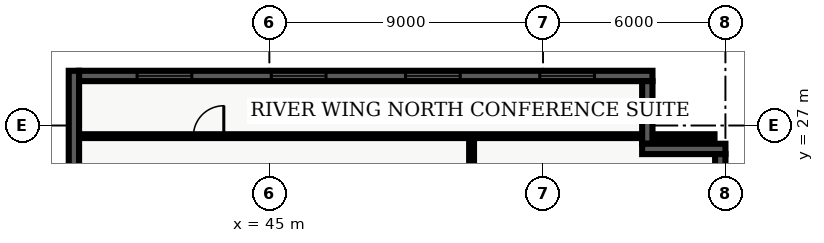
"""IFC4 building model, lengths in metres.
Left out: names, types, materials, properties, quantities, classifications, styles, units other than length and angle.
Written with IfcOpenShell. Run it as: python <this file> out.ifc"""

import sys

from ifc_helpers import new_model, entity, si_unit, converted_unit, direction, frame, origin_with_axes, origin_2d_with_axis, place, context, subcontext, project, spatial, polyline, rectangle, outline, extrude, element, fill, save


model = new_model("IFC4")
c1 = context("Model", 3, precision=1e-05, world=origin_with_axes(), true_north=direction((0.0, 1.0)))
c2 = subcontext(c1, "Body", "Model", "MODEL_VIEW")
j1 = project(units=[si_unit("LENGTHUNIT", "METRE"), converted_unit("PLANEANGLEUNIT", "DEGREE", entity("IfcPlaneAngleMeasure", 0.017), si_unit("PLANEANGLEUNIT", "RADIAN"), dimensions=[0, 0, 0, 0, 0, 0, 0])], contexts=[c1])
p1 = place(None, origin_with_axes())
s1 = spatial("IfcSite", under=j1, at=p1, CompositionType="ELEMENT")
p2 = place(p1, origin_with_axes())
s2 = spatial("IfcBuilding", under=s1, at=p2, CompositionType="ELEMENT")
p3 = place(p2, frame((0.0, 0.0, 212.1), z_axis=(0.0, 0.0, 1.0), x_axis=(1.0, 0.0, 0.0)))
s3 = spatial("IfcBuildingStorey", under=s2, at=p3, CompositionType="ELEMENT", Elevation=212.1)
p4 = place(p3, frame((51.65, 7.85, 0.0), z_axis=(0.0, 0.0, 1.0), x_axis=(0.0, 1.0, 0.0)))
e1 = element("IfcWall", 1, at=p4, inside=s3, PredefinedType="PARTITIONING", context=c2, shape_type="SweptSolid", body=[
    extrude(outline(polyline([(0.0, -0.08), (18.8, -0.08), (18.8, 0.08), (0.0, 0.08), (0.0, -0.08)])), origin_with_axes(), (0.0, 0.0, 1.0), 2.7),
])
p5 = place(p4, frame((4.298, 0.0, 0.0), z_axis=(0.0, 0.0, 1.0), x_axis=(1.0, 0.0, 0.0)))
e2 = element("IfcOpeningElement", 2, at=p5, cuts=e1, PredefinedType="OPENING", context=c2, shape_type="SweptSolid", body=[
    extrude(rectangle(XDim=1.0, YDim=0.18, at=origin_2d_with_axis()), origin_with_axes(), (0.0, 0.0, 1.0), 2.15),
])
p6 = place(p4, frame((13.639, 0.0, 0.0), z_axis=(0.0, 0.0, 1.0), x_axis=(1.0, 0.0, 0.0)))
e3 = element("IfcOpeningElement", 3, at=p6, cuts=e1, PredefinedType="OPENING", context=c2, shape_type="SweptSolid", body=[
    extrude(rectangle(XDim=1.0, YDim=0.18, at=origin_2d_with_axis()), origin_with_axes(), (0.0, 0.0, 1.0), 2.15),
])
p7 = place(p3, frame((38.735, 26.65, 0.0), z_axis=(0.0, 0.0, 1.0), x_axis=(1.0, 0.0, 0.0)))
e4 = element("IfcWall", 4, at=p7, inside=s3, PredefinedType="PARTITIONING", context=c2, shape_type="SweptSolid", body=[
    extrude(outline(polyline([(0.0, -0.062), (20.905, -0.062), (20.905, 0.062), (0.0, 0.062), (0.0, -0.062)])), origin_with_axes(), (0.0, 0.0, 1.0), 2.7),
])
p8 = place(p7, frame((4.265, 0.0, 0.0), z_axis=(0.0, 0.0, 1.0), x_axis=(1.0, 0.0, 0.0)))
e5 = element("IfcOpeningElement", 5, at=p8, cuts=e4, PredefinedType="OPENING", context=c2, shape_type="SweptSolid", body=[
    extrude(rectangle(XDim=1.0, YDim=0.145, at=origin_2d_with_axis()), origin_with_axes(), (0.0, 0.0, 1.0), 2.15),
])
p9 = place(p3, frame((38.57, 21.26, 0.0), z_axis=(0.0, 0.0, 1.0), x_axis=(0.0, 1.0, 0.0)))
e6 = element("IfcWall", 6, at=p9, inside=s3, PredefinedType="SOLIDWALL", context=c2, shape_type="SweptSolid", body=[
    extrude(outline(polyline([(0.0, -0.17), (7.54, -0.17), (7.54, 0.17), (0.0, 0.17), (0.0, -0.17)])), origin_with_axes(), (0.0, 0.0, 1.0), 3.66),
])
p10 = place(p3, frame((38.74, 28.63, 0.0), z_axis=(0.0, 0.0, 1.0), x_axis=(1.0, 0.0, 0.0)))
e7 = element("IfcWall", 7, at=p10, inside=s3, PredefinedType="SOLIDWALL", context=c2, shape_type="SweptSolid", body=[
    extrude(outline(polyline([(0.0, -0.17), (18.86, -0.17), (18.86, 0.17), (0.0, 0.17), (0.0, -0.17)])), origin_with_axes(), (0.0, 0.0, 1.0), 3.66),
])
p11 = place(p10, frame((2.808, 0.0, 0.45), z_axis=(0.0, 0.0, 1.0), x_axis=(1.0, 0.0, 0.0)))
e8 = element("IfcOpeningElement", 8, at=p11, cuts=e7, PredefinedType="OPENING", context=c2, shape_type="SweptSolid", body=[
    extrude(rectangle(XDim=1.8, YDim=0.36, at=origin_2d_with_axis()), origin_with_axes(), (0.0, 0.0, 1.0), 2.1),
])
p12 = place(p10, frame((7.222, 0.0, 0.45), z_axis=(0.0, 0.0, 1.0), x_axis=(1.0, 0.0, 0.0)))
e9 = element("IfcOpeningElement", 9, at=p12, cuts=e7, PredefinedType="OPENING", context=c2, shape_type="SweptSolid", body=[
    extrude(rectangle(XDim=1.8, YDim=0.36, at=origin_2d_with_axis()), origin_with_axes(), (0.0, 0.0, 1.0), 2.1),
])
p13 = place(p10, frame((11.637, 0.0, 0.45), z_axis=(0.0, 0.0, 1.0), x_axis=(1.0, 0.0, 0.0)))
e10 = element("IfcOpeningElement", 10, at=p13, cuts=e7, PredefinedType="OPENING", context=c2, shape_type="SweptSolid", body=[
    extrude(rectangle(XDim=1.8, YDim=0.36, at=origin_2d_with_axis()), origin_with_axes(), (0.0, 0.0, 1.0), 2.1),
])
p14 = place(p10, frame((16.053, 0.0, 0.45), z_axis=(0.0, 0.0, 1.0), x_axis=(1.0, 0.0, 0.0)))
e11 = element("IfcOpeningElement", 11, at=p14, cuts=e7, PredefinedType="OPENING", context=c2, shape_type="SweptSolid", body=[
    extrude(rectangle(XDim=1.8, YDim=0.36, at=origin_2d_with_axis()), origin_with_axes(), (0.0, 0.0, 1.0), 2.1),
])
p15 = place(p3, frame((57.43, 28.46, 0.0), z_axis=(0.0, 0.0, 1.0), x_axis=(0.0, -1.0, 0.0)))
e12 = element("IfcWall", 12, at=p15, inside=s3, PredefinedType="SOLIDWALL", context=c2, shape_type="SweptSolid", body=[
    extrude(outline(polyline([(0.0, -0.17), (2.06, -0.17), (2.06, 0.17), (0.0, 0.17), (0.0, -0.17)])), origin_with_axes(), (0.0, 0.0, 1.0), 3.66),
])
p16 = place(p3, frame((57.26, 26.23, 0.0), z_axis=(0.0, 0.0, 1.0), x_axis=(1.0, 0.0, 0.0)))
e13 = element("IfcWall", 13, at=p16, inside=s3, PredefinedType="SOLIDWALL", context=c2, shape_type="SweptSolid", body=[
    extrude(outline(polyline([(0.0, -0.17), (2.74, -0.17), (2.74, 0.17), (0.0, 0.17), (0.0, -0.17)])), origin_with_axes(), (0.0, 0.0, 1.0), 3.66),
])
p17 = place(p3, frame((59.83, 26.06, 0.0), z_axis=(0.0, 0.0, 1.0), x_axis=(0.0, -1.0, 0.0)))
e14 = element("IfcWall", 14, at=p17, inside=s3, PredefinedType="SOLIDWALL", context=c2, shape_type="SweptSolid", body=[
    extrude(outline(polyline([(0.0, -0.17), (23.66, -0.17), (23.66, 0.17), (0.0, 0.17), (0.0, -0.17)])), origin_with_axes(), (0.0, 0.0, 1.0), 3.66),
])
p18 = place(p17, frame((3.696, 0.0, 0.45), z_axis=(0.0, 0.0, 1.0), x_axis=(1.0, 0.0, 0.0)))
e15 = element("IfcOpeningElement", 15, at=p18, cuts=e14, PredefinedType="OPENING", context=c2, shape_type="SweptSolid", body=[
    extrude(rectangle(XDim=1.8, YDim=0.36, at=origin_2d_with_axis()), origin_with_axes(), (0.0, 0.0, 1.0), 2.1),
])
p19 = place(p17, frame((11.83, 0.0, 0.45), z_axis=(0.0, 0.0, 1.0), x_axis=(1.0, 0.0, 0.0)))
e16 = element("IfcOpeningElement", 16, at=p19, cuts=e14, PredefinedType="OPENING", context=c2, shape_type="SweptSolid", body=[
    extrude(rectangle(XDim=1.8, YDim=0.36, at=origin_2d_with_axis()), origin_with_axes(), (0.0, 0.0, 1.0), 2.1),
])
p20 = place(p17, frame((20.364, 0.0, 0.45), z_axis=(0.0, 0.0, 1.0), x_axis=(1.0, 0.0, 0.0)))
e17 = element("IfcOpeningElement", 17, at=p20, cuts=e14, PredefinedType="OPENING", context=c2, shape_type="SweptSolid", body=[
    extrude(rectangle(XDim=1.8, YDim=0.36, at=origin_2d_with_axis()), origin_with_axes(), (0.0, 0.0, 1.0), 2.1),
])
p21 = place(p7, frame((4.265, 0.0, 0.0), z_axis=(0.0, 0.0, 1.0), x_axis=(1.0, 0.0, 0.0)))
e18 = element("IfcDoor", 18, at=p21, inside=s3, OperationType="SINGLE_SWING_RIGHT", PredefinedType="DOOR", context=c2, shape_type="SweptSolid", body=[
    extrude(rectangle(XDim=1.0, YDim=0.075, at=origin_2d_with_axis()), origin_with_axes(), (0.0, 0.0, 1.0), 2.15),
])
fill(e5, e18)
p22 = place(p10, frame((2.808, 0.0, 0.45), z_axis=(0.0, 0.0, 1.0), x_axis=(1.0, 0.0, 0.0)))
e19 = element("IfcWindow", 19, at=p22, inside=s3, PredefinedType="WINDOW", context=c2, shape_type="SweptSolid", body=[
    extrude(rectangle(XDim=1.8, YDim=0.09, at=origin_2d_with_axis()), origin_with_axes(), (0.0, 0.0, 1.0), 2.1),
])
fill(e8, e19)
p23 = place(p10, frame((7.222, 0.0, 0.45), z_axis=(0.0, 0.0, 1.0), x_axis=(1.0, 0.0, 0.0)))
e20 = element("IfcWindow", 20, at=p23, inside=s3, PredefinedType="WINDOW", context=c2, shape_type="SweptSolid", body=[
    extrude(rectangle(XDim=1.8, YDim=0.09, at=origin_2d_with_axis()), origin_with_axes(), (0.0, 0.0, 1.0), 2.1),
])
fill(e9, e20)
p24 = place(p10, frame((11.637, 0.0, 0.45), z_axis=(0.0, 0.0, 1.0), x_axis=(1.0, 0.0, 0.0)))
e21 = element("IfcWindow", 21, at=p24, inside=s3, PredefinedType="WINDOW", context=c2, shape_type="SweptSolid", body=[
    extrude(rectangle(XDim=1.8, YDim=0.09, at=origin_2d_with_axis()), origin_with_axes(), (0.0, 0.0, 1.0), 2.1),
])
fill(e10, e21)
p25 = place(p10, frame((16.053, 0.0, 0.45), z_axis=(0.0, 0.0, 1.0), x_axis=(1.0, 0.0, 0.0)))
e22 = element("IfcWindow", 22, at=p25, inside=s3, PredefinedType="WINDOW", context=c2, shape_type="SweptSolid", body=[
    extrude(rectangle(XDim=1.8, YDim=0.09, at=origin_2d_with_axis()), origin_with_axes(), (0.0, 0.0, 1.0), 2.1),
])
fill(e11, e22)
save(model, sys.argv[1])
